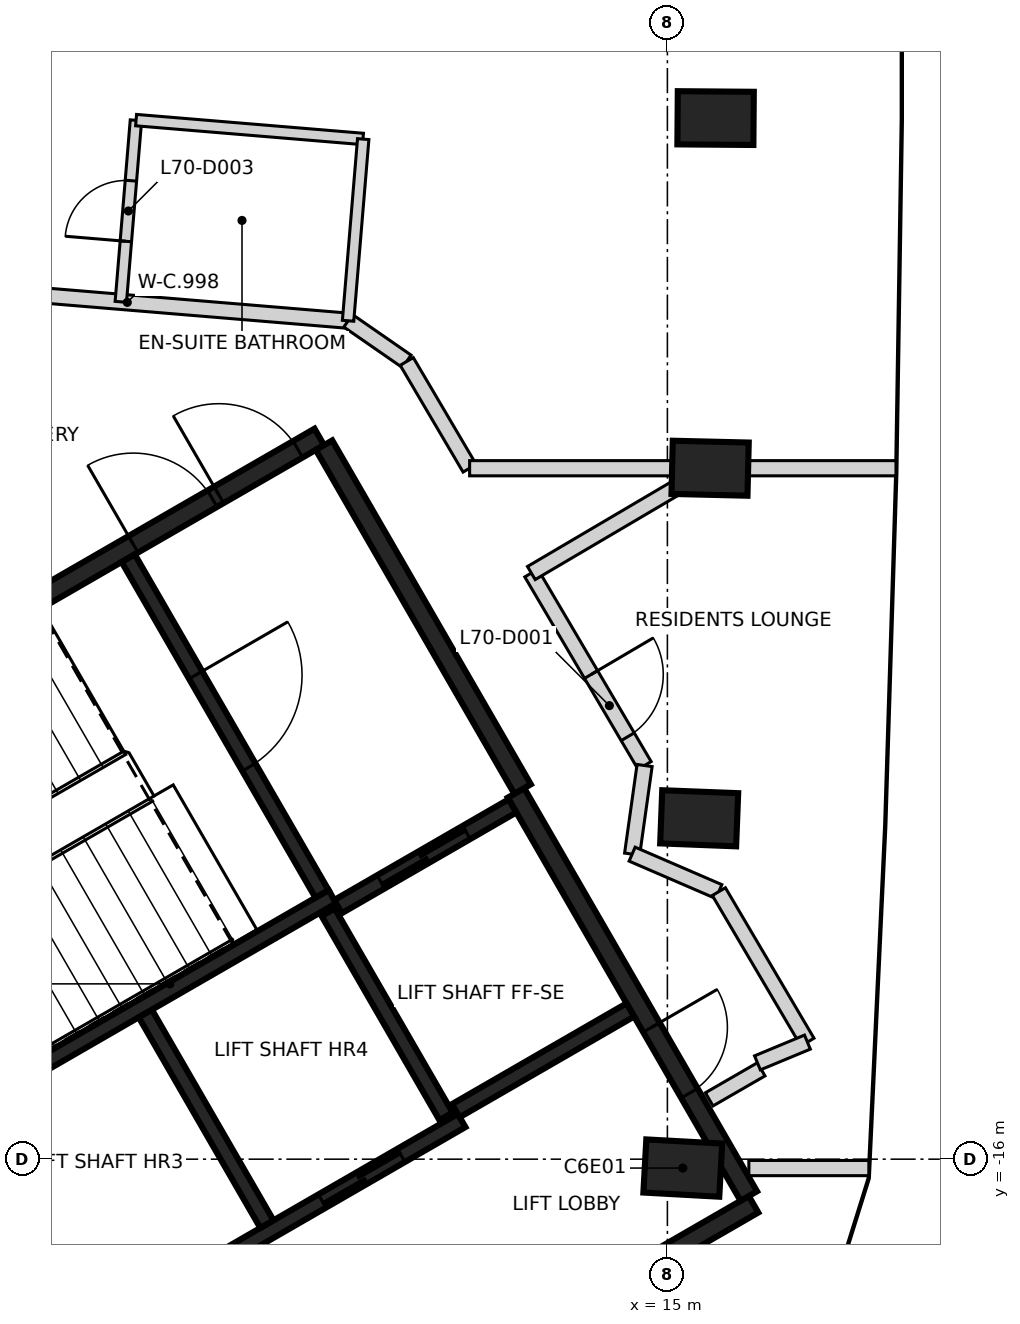
"""IFC4 building model, lengths in metres.
Left out: names, types, materials, properties, quantities, classifications, styles, units other than length and angle.
Written with IfcOpenShell. Run it as: python <this file> out.ifc"""

import sys

from ifc_helpers import new_model, si_unit, direction, frame, frame_2d, origin, origin_2d, place, context, subcontext, project, spatial, rectangle, extrude, element, fill, save


model = new_model("IFC4")
c1 = context("Model", 3, precision=1e-05, world=origin(), true_north=direction((0.0, 1.0)))
c2 = subcontext(c1, "Body", "Model", "MODEL_VIEW")
j1 = project(units=[si_unit("LENGTHUNIT", "METRE"), si_unit("PLANEANGLEUNIT", "RADIAN")], contexts=[c1])
p1 = place(None, origin())
s1 = spatial("IfcSite", under=j1, at=p1, CompositionType="ELEMENT")
p2 = place(p1, origin())
s2 = spatial("IfcBuilding", under=s1, at=p2, CompositionType="ELEMENT")
p3 = place(p2, frame((0.0, 0.0, 276.6)))
s3 = spatial("IfcBuildingStorey", under=s2, at=p3, CompositionType="ELEMENT", Elevation=276.6)
for number, where, z_axis, x_axis in (
    (1, (15.202, -16.117, -0.35), (0.0, 0.0, 1.0), (-0.998, 0.055, 0.0)),
    (2, (15.418, -11.515, -0.35), (0.0, 0.0, 1.0), (-0.999, 0.039, 0.0)),
    (3, (15.562, -6.91, -0.35), (0.0, 0.0, 1.0), (-1.0, 0.024, 0.0)),
    (4, (15.634, -2.303, -0.35), (0.0, 0.0, 1.0), (-1.0, 0.008, 0.0)),
):
    element("IfcColumn", number, at=place(p3, frame(where, z_axis=z_axis, x_axis=x_axis)), inside=s3, PredefinedType="COLUMN", context=c2, shape_type="SweptSolid", body=[
        extrude(rectangle(XDim=1.0, YDim=0.7, at=origin_2d()), origin(), (0.0, 0.0, 1.0), 3.6),
    ])
p4 = place(p3, frame((0.417, -12.273, 0.0), z_axis=(0.0, 0.0, 1.0), x_axis=(0.866021906294, 0.500006057782, 0.0)))
e5 = element("IfcWall", 5, at=p4, inside=s3, PredefinedType="SHEAR", context=c2, shape_type="SweptSolid", body=[
    extrude(rectangle(XDim=11.55, YDim=0.25, at=frame_2d((5.775, 0.0))), origin(), (0.0, 0.0, 1.0), 3.25),
])
p5 = place(p4, frame((10.025, 0.0, 0.0)))
e6 = element("IfcOpeningElement", 6, at=p5, cuts=e5, PredefinedType="OPENING", context=c2, shape_type="SweptSolid", body=[
    extrude(rectangle(XDim=1.2, YDim=2.1, at=frame_2d((0.6, 1.05))), frame((0.0, 0.135, 0.0), z_axis=(0.0, -1.0, 0.0), x_axis=(1.0, 0.0, 0.0)), (0.0, 0.0, 1.0), 0.27),
])
p6 = place(p4, frame((8.725, 0.0, 0.0)))
e7 = element("IfcOpeningElement", 7, at=p6, cuts=e5, PredefinedType="OPENING", context=c2, shape_type="SweptSolid", body=[
    extrude(rectangle(XDim=1.2, YDim=2.1, at=frame_2d((0.6, 1.05))), frame((0.0, 0.135, 0.0), z_axis=(0.0, -1.0, 0.0), x_axis=(1.0, 0.0, 0.0)), (0.0, 0.0, 1.0), 0.27),
])
p7 = place(p3, frame((16.133, -16.594, 0.0), z_axis=(0.0, 0.0, 1.0), x_axis=(-0.866022959057, -0.500004234368, 0.0)))
e8 = element("IfcWall", 8, at=p7, inside=s3, PredefinedType="SHEAR", context=c2, shape_type="SweptSolid", body=[
    extrude(rectangle(XDim=8.75, YDim=0.25, at=frame_2d((4.375, 0.0))), origin(), (0.0, 0.0, 1.0), 3.25),
])
p8 = place(p3, frame((13.008, -11.181, 0.0), z_axis=(0.0, 0.0, 1.0), x_axis=(0.500001955336, -0.866024274868, 0.0)))
e9 = element("IfcWall", 9, at=p8, inside=s3, PredefinedType="SHEAR", context=c2, shape_type="SweptSolid", body=[
    extrude(rectangle(XDim=6.125, YDim=0.25, at=frame_2d((3.062, 0.0))), origin(), (0.0, 0.0, 1.0), 3.25),
])
p9 = place(p8, frame((3.563, 0.0, 0.0)))
e10 = element("IfcOpeningElement", 10, at=p9, cuts=e9, PredefinedType="OPENING", context=c2, shape_type="SweptSolid", body=[
    extrude(rectangle(XDim=1.0, YDim=2.1, at=frame_2d((0.5, 1.05))), frame((0.0, 0.135, 0.0), z_axis=(0.0, -1.0, 0.0), x_axis=(1.0, 0.0, 0.0)), (0.0, 0.0, 1.0), 0.27),
])
p10 = place(p3, frame((10.483, -6.606, 0.0), z_axis=(0.0, 0.0, 1.0), x_axis=(0.49999885962, -0.866026062182, 0.0)))
e11 = element("IfcWall", 11, at=p10, inside=s3, PredefinedType="SHEAR", context=c2, shape_type="SweptSolid", body=[
    extrude(rectangle(XDim=5.225, YDim=0.25, at=frame_2d((2.612, 0.0))), origin(), (0.0, 0.0, 1.0), 3.25),
])
p11 = place(p3, frame((5.419, -15.534, 0.0), z_axis=(0.0, 0.0, 1.0), x_axis=(0.866029065029, 0.499993658486, 0.0)))
e12 = element("IfcWall", 12, at=p11, inside=s3, PredefinedType="SHEAR", context=c2, shape_type="SweptSolid", body=[
    extrude(rectangle(XDim=5.974, YDim=0.2, at=frame_2d((2.987, 0.0))), origin(), (0.0, 0.0, 1.0), 3.25),
])
p12 = place(p3, frame((7.01, -18.542, 0.0), z_axis=(0.0, 0.0, 1.0), x_axis=(0.866030299012, 0.499991521122, 0.0)))
e13 = element("IfcWall", 13, at=p12, inside=s3, PredefinedType="SHEAR", context=c2, shape_type="SweptSolid", body=[
    extrude(rectangle(XDim=6.1, YDim=0.2, at=frame_2d((3.05, 0.0))), origin(), (0.0, 0.0, 1.0), 3.25),
])
p13 = place(p12, frame((1.0, 0.0, 0.0)))
e14 = element("IfcOpeningElement", 14, at=p13, cuts=e13, PredefinedType="OPENING", context=c2, shape_type="SweptSolid", body=[
    extrude(rectangle(XDim=1.2, YDim=2.1, at=frame_2d((0.6, 1.05))), frame((0.0, 0.11, 0.0), z_axis=(0.0, -1.0, 0.0), x_axis=(1.0, 0.0, 0.0)), (0.0, 0.0, 1.0), 0.22),
])
p14 = place(p12, frame((3.982, 0.0, 0.0)))
e15 = element("IfcOpeningElement", 15, at=p14, cuts=e13, PredefinedType="OPENING", context=c2, shape_type="SweptSolid", body=[
    extrude(rectangle(XDim=1.2, YDim=2.1, at=frame_2d((0.6, 1.05))), frame((0.0, 0.11, 0.0), z_axis=(0.0, -1.0, 0.0), x_axis=(1.0, 0.0, 0.0)), (0.0, 0.0, 1.0), 0.22),
])
p15 = place(p3, frame((7.906, -8.094, 0.0), z_axis=(0.0, 0.0, 1.0), x_axis=(0.500027839223, -0.866009330205, 0.0)))
e16 = element("IfcWall", 16, at=p15, inside=s3, PredefinedType="SHEAR", context=c2, shape_type="SweptSolid", body=[
    extrude(rectangle(XDim=5.098, YDim=0.2, at=frame_2d((2.549, 0.0))), origin(), (0.0, 0.0, 1.0), 3.25),
])
p16 = place(p15, frame((1.774, 0.0, 0.0)))
e17 = element("IfcOpeningElement", 17, at=p16, cuts=e16, PredefinedType="OPENING", context=c2, shape_type="SweptSolid", body=[
    extrude(rectangle(XDim=1.4, YDim=2.1, at=frame_2d((0.7, 1.05))), frame((0.0, 0.11, 0.0), z_axis=(0.0, -1.0, 0.0), x_axis=(1.0, 0.0, 0.0)), (0.0, 0.0, 1.0), 0.22),
])
p17 = place(p3, frame((8.132, -14.084, 0.0), z_axis=(0.0, 0.0, 1.0), x_axis=(0.499997778408, -0.866026686418, 0.0)))
e18 = element("IfcWall", 18, at=p17, inside=s3, PredefinedType="SHEAR", context=c2, shape_type="SweptSolid", body=[
    extrude(rectangle(XDim=3.198, YDim=0.2, at=frame_2d((1.599, 0.0))), origin(), (0.0, 0.0, 1.0), 3.25),
])
p18 = place(p3, frame((6.96, -18.455, 0.0), z_axis=(0.0, 0.0, 1.0), x_axis=(-0.499926705758, 0.866067716099, 0.0)))
e19 = element("IfcWall", 19, at=p18, inside=s3, PredefinedType="SHEAR", context=c2, shape_type="SweptSolid", body=[
    extrude(rectangle(XDim=2.759, YDim=0.2, at=frame_2d((1.38, 0.0))), origin(), (0.0, 0.0, 1.0), 3.25),
])
p19 = place(p3, frame((12.088, -15.437, 0.0), z_axis=(0.0, 0.0, 1.0), x_axis=(-0.500026960575, 0.86600983753, 0.0)))
e20 = element("IfcWall", 20, at=p19, inside=s3, PredefinedType="SHEAR", context=c2, shape_type="SweptSolid", body=[
    extrude(rectangle(XDim=3.1, YDim=0.2, at=frame_2d((1.55, 0.0))), origin(), (0.0, 0.0, 1.0), 3.25),
])
p20 = place(p3, frame((10.666, -12.678, 0.0), z_axis=(0.0, 0.0, 1.0), x_axis=(0.866018407898, 0.500012117035, 0.0)))
e21 = element("IfcWall", 21, at=p20, inside=s3, PredefinedType="SHEAR", context=c2, shape_type="SweptSolid", body=[
    extrude(rectangle(XDim=2.651, YDim=0.2, at=frame_2d((1.325, 0.0))), origin(), (0.0, 0.0, 1.0), 3.25),
])
p21 = place(p20, frame((0.652, 0.0, 0.0)))
e22 = element("IfcOpeningElement", 22, at=p21, cuts=e21, PredefinedType="OPENING", context=c2, shape_type="SweptSolid", body=[
    extrude(rectangle(XDim=1.3, YDim=2.1, at=frame_2d((0.65, 1.05))), frame((0.0, 0.11, 0.0), z_axis=(0.0, -1.0, 0.0), x_axis=(1.0, 0.0, 0.0)), (0.0, 0.0, 1.0), 0.22),
])
p22 = place(p3, frame((14.512, -14.037, 0.0), z_axis=(0.0, 0.0, 1.0), x_axis=(-0.866018407898, -0.500012117035, 0.0)))
e23 = element("IfcWall", 23, at=p22, inside=s3, PredefinedType="SHEAR", context=c2, shape_type="SweptSolid", body=[
    extrude(rectangle(XDim=2.651, YDim=0.2, at=frame_2d((1.325, 0.0))), origin(), (0.0, 0.0, 1.0), 3.25),
])
p23 = place(p3, frame((4.988, -4.487, 0.0), z_axis=(0.0, 0.0, 1.0), x_axis=(0.996576293439, -0.08267823992, 0.0)))
e24 = element("IfcWall", 24, at=p23, inside=s3, PredefinedType="PARTITIONING", context=c2, shape_type="SweptSolid", body=[
    extrude(rectangle(XDim=5.832, YDim=0.2, at=frame_2d((2.916, 0.0))), origin(), (0.0, 0.0, 1.0), 3.25),
])
p24 = place(p23, frame((0.2, 0.0, 0.0)))
e25 = element("IfcOpeningElement", 25, at=p24, cuts=e24, PredefinedType="OPENING", context=c2, shape_type="SweptSolid", body=[
    extrude(rectangle(XDim=0.95, YDim=2.1, at=frame_2d((0.475, 1.05))), frame((0.0, 0.11, 0.0), z_axis=(0.0, -1.0, 0.0), x_axis=(1.0, 0.0, 0.0)), (0.0, 0.0, 1.0), 0.22),
])
p25 = place(p3, frame((10.8, -4.97, 0.0), z_axis=(0.0, 0.0, 1.0), x_axis=(0.822107837165, -0.569331804902, 0.0)))
e26 = element("IfcWall", 26, at=p25, inside=s3, PredefinedType="PARTITIONING", context=c2, shape_type="SweptSolid", body=[
    extrude(rectangle(XDim=0.938, YDim=0.2, at=frame_2d((0.469, 0.0))), origin(), (0.0, 0.0, 1.0), 3.25),
])
p26 = place(p3, frame((11.571, -5.505, 0.0), z_axis=(0.0, 0.0, 1.0), x_axis=(0.507321116571, -0.86175709146, 0.0)))
e27 = element("IfcWall", 27, at=p26, inside=s3, PredefinedType="PARTITIONING", context=c2, shape_type="SweptSolid", body=[
    extrude(rectangle(XDim=1.63, YDim=0.2, at=frame_2d((0.815, 0.0))), origin(), (0.0, 0.0, 1.0), 3.25),
])
p27 = place(p3, frame((12.398, -6.91, 0.0), z_axis=(0.0, 0.0, 1.0), x_axis=(1.0, 0.0, 0.0)))
e28 = element("IfcWall", 28, at=p27, inside=s3, PredefinedType="PARTITIONING", context=c2, shape_type="SweptSolid", body=[
    extrude(rectangle(XDim=2.762, YDim=0.2, at=frame_2d((1.381, 0.0))), origin(), (0.0, 0.0, 1.0), 3.25),
])
p28 = place(p3, frame((13.21, -8.289, 0.0), z_axis=(0.0, 0.0, 1.0), x_axis=(0.507314348132, -0.861761076041, 0.0)))
e29 = element("IfcWall", 29, at=p28, inside=s3, PredefinedType="PARTITIONING", context=c2, shape_type="SweptSolid", body=[
    extrude(rectangle(XDim=2.937, YDim=0.2, at=frame_2d((1.469, 0.0))), origin(), (0.0, 0.0, 1.0), 3.25),
])
p29 = place(p28, frame((1.549, 0.0, 0.0)))
e30 = element("IfcOpeningElement", 30, at=p29, cuts=e29, PredefinedType="OPENING", context=c2, shape_type="SweptSolid", body=[
    extrude(rectangle(XDim=0.95, YDim=2.1, at=frame_2d((0.475, 1.05))), frame((0.0, 0.11, 0.0), z_axis=(0.0, -1.0, 0.0), x_axis=(1.0, 0.0, 0.0)), (0.0, 0.0, 1.0), 0.22),
])
p30 = place(p3, frame((13.21, -8.289, 0.0), z_axis=(0.0, 0.0, 1.0), x_axis=(0.861654599216, 0.507495174017, 0.0)))
e31 = element("IfcWall", 31, at=p30, inside=s3, PredefinedType="PARTITIONING", context=c2, shape_type="SweptSolid", body=[
    extrude(rectangle(XDim=2.38, YDim=0.2, at=frame_2d((1.19, 0.0))), origin(), (0.0, 0.0, 1.0), 3.25),
])
p31 = place(p3, frame((14.536, -11.987, 0.0), z_axis=(0.0, 0.0, 1.0), x_axis=(0.139331074948, 0.990245854096, 0.0)))
e32 = element("IfcWall", 32, at=p31, inside=s3, PredefinedType="PARTITIONING", context=c2, shape_type="SweptSolid", body=[
    extrude(rectangle(XDim=1.177, YDim=0.2, at=frame_2d((0.589, 0.0))), origin(), (0.0, 0.0, 1.0), 3.25),
])
p32 = place(p3, frame((14.536, -11.987, 0.0), z_axis=(0.0, 0.0, 1.0), x_axis=(0.918013607861, -0.396548881958, 0.0)))
e33 = element("IfcWall", 33, at=p32, inside=s3, PredefinedType="PARTITIONING", context=c2, shape_type="SweptSolid", body=[
    extrude(rectangle(XDim=1.243, YDim=0.2, at=frame_2d((0.622, 0.0))), origin(), (0.0, 0.0, 1.0), 2.35),
])
p33 = place(p3, frame((15.55, -15.213, 0.0), z_axis=(0.0, 0.0, 1.0), x_axis=(0.865989998118, 0.500061319399, 0.0)))
e34 = element("IfcWall", 34, at=p33, inside=s3, PredefinedType="PARTITIONING", context=c2, shape_type="SweptSolid", body=[
    extrude(rectangle(XDim=0.79, YDim=0.2, at=frame_2d((0.395, 0.0))), origin(), (0.0, 0.0, 1.0), 3.25),
])
p34 = place(p3, frame((15.677, -12.48, 0.0), z_axis=(0.0, 0.0, 1.0), x_axis=(0.507256975253, -0.861794848591, 0.0)))
e35 = element("IfcWall", 35, at=p34, inside=s3, PredefinedType="PARTITIONING", context=c2, shape_type="SweptSolid", body=[
    extrude(rectangle(XDim=2.297, YDim=0.2, at=frame_2d((1.148, 0.0))), origin(), (0.0, 0.0, 1.0), 3.25),
])
p35 = place(p3, frame((16.185, -14.733, 0.0), z_axis=(0.0, 0.0, 1.0), x_axis=(0.923472400107, 0.38366486188, 0.0)))
e36 = element("IfcWall", 36, at=p35, inside=s3, PredefinedType="PARTITIONING", context=c2, shape_type="SweptSolid", body=[
    extrude(rectangle(XDim=0.711, YDim=0.2, at=frame_2d((0.356, 0.0))), origin(), (0.0, 0.0, 1.0), 3.25),
])
p36 = place(p3, frame((15.161, -6.91, 0.0), z_axis=(0.0, 0.0, 1.0), x_axis=(1.0, 0.0, 0.0)))
e37 = element("IfcWall", 37, at=p36, inside=s3, PredefinedType="PARTITIONING", context=c2, shape_type="SweptSolid", body=[
    extrude(rectangle(XDim=2.846, YDim=0.2, at=frame_2d((1.423, 0.0))), origin(), (0.0, 0.0, 1.0), 3.25),
])
p37 = place(p3, frame((16.072, -16.117, 0.0), z_axis=(0.0, 0.0, 1.0), x_axis=(1.0, 0.0, 0.0)))
e38 = element("IfcWall", 38, at=p37, inside=s3, PredefinedType="PARTITIONING", context=c2, shape_type="SweptSolid", body=[
    extrude(rectangle(XDim=1.578, YDim=0.2, at=frame_2d((0.789, 0.0))), origin(), (0.0, 0.0, 1.0), 3.25),
])
p38 = place(p3, frame((7.809, -4.721, 0.0), z_axis=(0.0, 0.0, 1.0), x_axis=(0.08303704791, 0.996546460871, 0.0)))
e39 = element("IfcWall", 39, at=p38, inside=s3, PredefinedType="PARTITIONING", context=c2, shape_type="SweptSolid", body=[
    extrude(rectangle(XDim=2.396, YDim=0.15, at=frame_2d((1.198, 0.0))), origin(), (0.0, 0.0, 1.0), 3.25),
])
p39 = place(p38, frame((0.8, 0.0, 0.0)))
e40 = element("IfcOpeningElement", 40, at=p39, cuts=e39, PredefinedType="OPENING", context=c2, shape_type="SweptSolid", body=[
    extrude(rectangle(XDim=0.8, YDim=2.1, at=frame_2d((0.4, 1.05))), frame((0.0, 0.085, 0.0), z_axis=(0.0, -1.0, 0.0), x_axis=(1.0, 0.0, 0.0)), (0.0, 0.0, 1.0), 0.17),
])
p40 = place(p3, frame((8.01, -2.33, 0.0), z_axis=(0.0, 0.0, 1.0), x_axis=(0.996572126957, -0.082728445969, 0.0)))
e41 = element("IfcWall", 41, at=p40, inside=s3, PredefinedType="PARTITIONING", context=c2, shape_type="SweptSolid", body=[
    extrude(rectangle(XDim=2.995, YDim=0.15, at=frame_2d((1.498, 0.0))), origin(), (0.0, 0.0, 1.0), 3.25),
])
p41 = place(p3, frame((10.799, -4.97, 0.0), z_axis=(0.0, 0.0, 1.0), x_axis=(0.08296965374, 0.996552074183, 0.0)))
e42 = element("IfcWall", 42, at=p41, inside=s3, PredefinedType="PARTITIONING", context=c2, shape_type="SweptSolid", body=[
    extrude(rectangle(XDim=2.398, YDim=0.15, at=frame_2d((1.199, 0.0))), origin(), (0.0, 0.0, 1.0), 3.25),
])
p42 = place(p21, origin())
e43 = element("IfcDoor", 43, at=p42, inside=s3, OperationType="SLIDING_TO_LEFT", PredefinedType="DOOR", context=c2, shape_type="SweptSolid", body=[
    extrude(rectangle(XDim=1.3, YDim=2.1, at=frame_2d((0.65, 1.05))), frame((0.0, 0.025, 0.0), z_axis=(0.0, -1.0, 0.0), x_axis=(1.0, 0.0, 0.0)), (0.0, 0.0, 1.0), 0.05),
])
fill(e22, e43)
p43 = place(p14, origin())
e44 = element("IfcDoor", 44, at=p43, inside=s3, OperationType="DOUBLE_DOOR_SLIDING", PredefinedType="DOOR", context=c2, shape_type="SweptSolid", body=[
    extrude(rectangle(XDim=1.2, YDim=2.1, at=frame_2d((0.6, 1.05))), frame((0.0, 0.025, 0.0), z_axis=(0.0, -1.0, 0.0), x_axis=(1.0, 0.0, 0.0)), (0.0, 0.0, 1.0), 0.05),
])
fill(e15, e44)
p44 = place(p9, origin())
e45 = element("IfcDoor", 45, at=p44, inside=s3, OperationType="SINGLE_SWING_LEFT", PredefinedType="DOOR", context=c2, shape_type="SweptSolid", body=[
    extrude(rectangle(XDim=1.0, YDim=2.1, at=frame_2d((0.5, 1.05))), frame((0.0, 0.025, 0.0), z_axis=(0.0, -1.0, 0.0), x_axis=(1.0, 0.0, 0.0)), (0.0, 0.0, 1.0), 0.05),
])
fill(e10, e45)
p45 = place(p5, origin())
e46 = element("IfcDoor", 46, at=p45, inside=s3, OperationType="SINGLE_SWING_LEFT", PredefinedType="DOOR", context=c2, shape_type="SweptSolid", body=[
    extrude(rectangle(XDim=1.2, YDim=2.1, at=frame_2d((0.6, 1.05))), frame((0.0, 0.025, 0.0), z_axis=(0.0, -1.0, 0.0), x_axis=(1.0, 0.0, 0.0)), (0.0, 0.0, 1.0), 0.05),
])
fill(e6, e46)
p46 = place(p6, origin())
e47 = element("IfcDoor", 47, at=p46, inside=s3, OperationType="SINGLE_SWING_RIGHT", PredefinedType="DOOR", context=c2, shape_type="SweptSolid", body=[
    extrude(rectangle(XDim=1.2, YDim=2.1, at=frame_2d((0.6, 1.05))), frame((0.0, 0.025, 0.0), z_axis=(0.0, -1.0, 0.0), x_axis=(1.0, 0.0, 0.0)), (0.0, 0.0, 1.0), 0.05),
])
fill(e7, e47)
p47 = place(p16, origin())
e48 = element("IfcDoor", 48, at=p47, inside=s3, OperationType="SINGLE_SWING_LEFT", PredefinedType="DOOR", context=c2, shape_type="SweptSolid", body=[
    extrude(rectangle(XDim=1.4, YDim=2.1, at=frame_2d((0.7, 1.05))), frame((0.0, 0.025, 0.0), z_axis=(0.0, -1.0, 0.0), x_axis=(1.0, 0.0, 0.0)), (0.0, 0.0, 1.0), 0.05),
])
fill(e17, e48)
p48 = place(p29, origin())
e49 = element("IfcDoor", 49, at=p48, inside=s3, OperationType="SINGLE_SWING_LEFT", PredefinedType="DOOR", context=c2, shape_type="SweptSolid", body=[
    extrude(rectangle(XDim=0.95, YDim=2.1, at=frame_2d((0.475, 1.05))), frame((0.0, 0.025, 0.0), z_axis=(0.0, -1.0, 0.0), x_axis=(1.0, 0.0, 0.0)), (0.0, 0.0, 1.0), 0.05),
])
fill(e30, e49)
p49 = place(p39, frame((0.8, 0.0, 0.0), z_axis=(0.0, 0.0, 1.0), x_axis=(-1.0, 0.0, 0.0)))
e50 = element("IfcDoor", 50, at=p49, inside=s3, OperationType="SINGLE_SWING_LEFT", PredefinedType="DOOR", context=c2, shape_type="SweptSolid", body=[
    extrude(rectangle(XDim=0.8, YDim=2.1, at=frame_2d((0.4, 1.05))), frame((0.0, 0.025, 0.0), z_axis=(0.0, -1.0, 0.0), x_axis=(1.0, 0.0, 0.0)), (0.0, 0.0, 1.0), 0.05),
])
fill(e40, e50)
save(model, sys.argv[1])
